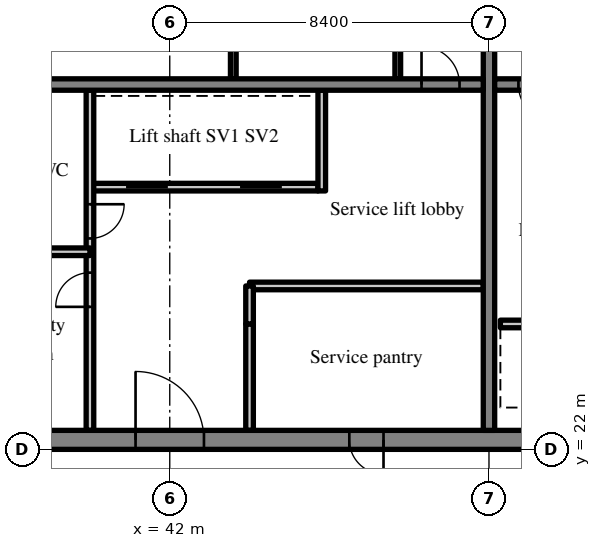
"""IFC4 building model, lengths in metres.
Left out: names, types, materials, properties, quantities, classifications, styles, units other than length and angle.
Written with IfcOpenShell. Run it as: python <this file> out.ifc"""

import sys

from ifc_helpers import new_model, si_unit, direction, frame, frame_2d, origin, place, context, subcontext, project, spatial, rectangle, extrude, source, transform, mapped, element, fill, save


model = new_model("IFC4")
c1 = context("Model", 3, precision=1e-05, world=origin(), true_north=direction((0.0, 1.0)))
c2 = subcontext(c1, "Body", "Model", "MODEL_VIEW")
j1 = project(units=[si_unit("LENGTHUNIT", "METRE"), si_unit("PLANEANGLEUNIT", "RADIAN")], contexts=[c1])
p1 = place(None, origin())
s1 = spatial("IfcSite", under=j1, at=p1, CompositionType="ELEMENT")
p2 = place(p1, origin())
s2 = spatial("IfcBuilding", under=s1, at=p2, CompositionType="ELEMENT")
p3 = place(p2, frame((0.0, 0.0, 313.7)))
s3 = spatial("IfcBuildingStorey", under=s2, at=p3, CompositionType="ELEMENT", Elevation=313.7)
m1 = source(origin(), c2, "Body", "SweptSolid", [
    extrude(rectangle(XDim=50.4, YDim=0.5, at=frame_2d((25.2, 0.0))), origin(), (0.0, 0.0, 1.0), 3.72),
])
p4 = place(p3, frame((25.2, 22.25, 0.0), z_axis=(0.0, 0.0, 1.0), x_axis=(1.0, 0.0, 0.0)))
e1 = element("IfcWall", 1, at=p4, inside=s3, PredefinedType="SHEAR", context=c2, shape_type="MappedRepresentation", body=[
    mapped(m1, transform((0.0, 0.0, 0.0), scale=1.0)),
])
m2 = source(origin(), c2, "Body", "SweptSolid", [
    extrude(rectangle(XDim=1.8, YDim=2.1, at=frame_2d((0.9, 1.05))), frame((0.0, 0.26, 0.0), z_axis=(0.0, -1.0, 0.0), x_axis=(1.0, 0.0, 0.0)), (0.0, 0.0, 1.0), 0.52),
])
p5 = place(p4, frame((15.9, 0.0, 0.0)))
e2 = element("IfcOpeningElement", 2, at=p5, cuts=e1, PredefinedType="OPENING", context=c2, shape_type="MappedRepresentation", body=[
    mapped(m2, transform((0.0, 0.0, 0.0), scale=1.0)),
])
m3 = source(origin(), c2, "Body", "SweptSolid", [
    extrude(rectangle(XDim=0.9, YDim=2.1, at=frame_2d((0.45, 1.05))), frame((0.0, 0.26, 0.0), z_axis=(0.0, -1.0, 0.0), x_axis=(1.0, 0.0, 0.0)), (0.0, 0.0, 1.0), 0.52),
])
p6 = place(p4, frame((9.675, 0.0, 0.0)))
e3 = element("IfcOpeningElement", 3, at=p6, cuts=e1, PredefinedType="OPENING", context=c2, shape_type="MappedRepresentation", body=[
    mapped(m3, transform((0.0, 0.0, 0.0), scale=1.0)),
])
p7 = place(p4, frame((21.525, 0.0, 0.0)))
e4 = element("IfcOpeningElement", 4, at=p7, cuts=e1, PredefinedType="OPENING", context=c2, shape_type="MappedRepresentation", body=[
    mapped(m3, transform((0.0, 0.0, 0.0), scale=1.0)),
])
p8 = place(p4, frame((32.7, 0.0, 0.0)))
e5 = element("IfcOpeningElement", 5, at=p8, cuts=e1, PredefinedType="OPENING", context=c2, shape_type="MappedRepresentation", body=[
    mapped(m2, transform((0.0, 0.0, 0.0), scale=1.0)),
])
m4 = source(origin(), c2, "Body", "SweptSolid", [
    extrude(rectangle(XDim=1.2, YDim=2.1, at=frame_2d((0.6, 1.05))), frame((0.0, 0.26, 0.0), z_axis=(0.0, -1.0, 0.0), x_axis=(1.0, 0.0, 0.0)), (0.0, 0.0, 1.0), 0.52),
])
p9 = place(p4, frame((6.5, 0.0, 0.0)))
e6 = element("IfcOpeningElement", 6, at=p9, cuts=e1, PredefinedType="OPENING", context=c2, shape_type="MappedRepresentation", body=[
    mapped(m4, transform((0.0, 0.0, 0.0), scale=1.0)),
])
p10 = place(p4, frame((47.975, 0.0, 0.0)))
e7 = element("IfcOpeningElement", 7, at=p10, cuts=e1, PredefinedType="OPENING", context=c2, shape_type="MappedRepresentation", body=[
    mapped(m4, transform((0.0, 0.0, 0.0), scale=1.0)),
])
m5 = source(origin(), c2, "Body", "SweptSolid", [
    extrude(rectangle(XDim=19.0, YDim=0.3, at=frame_2d((9.5, 0.0))), origin(), (0.0, 0.0, 1.0), 3.72),
])
p11 = place(p3, frame((50.4, 22.5, 0.0), z_axis=(0.0, 0.0, 1.0), x_axis=(0.0, 1.0, 0.0)))
e8 = element("IfcWall", 8, at=p11, inside=s3, PredefinedType="SHEAR", context=c2, shape_type="MappedRepresentation", body=[
    mapped(m5, transform((0.0, 0.0, 0.0), scale=1.0)),
])
m6 = source(origin(), c2, "Body", "SweptSolid", [
    extrude(rectangle(XDim=1.1, YDim=2.1, at=frame_2d((0.55, 1.05))), frame((0.0, 0.16, 0.0), z_axis=(0.0, -1.0, 0.0), x_axis=(1.0, 0.0, 0.0)), (0.0, 0.0, 1.0), 0.32),
])
p12 = place(p11, frame((12.95, 0.0, 0.0)))
e9 = element("IfcOpeningElement", 9, at=p12, cuts=e8, PredefinedType="OPENING", context=c2, shape_type="MappedRepresentation", body=[
    mapped(m6, transform((0.0, 0.0, 0.0), scale=1.0)),
])
m7 = source(origin(), c2, "Body", "SweptSolid", [
    extrude(rectangle(XDim=16.5, YDim=0.3, at=frame_2d((8.25, 0.0))), origin(), (0.0, 0.0, 1.0), 3.72),
])
p13 = place(p3, frame((33.75, 31.6, 0.0), z_axis=(0.0, 0.0, 1.0), x_axis=(1.0, 0.0, 0.0)))
e10 = element("IfcWall", 10, at=p13, inside=s3, PredefinedType="SHEAR", context=c2, shape_type="MappedRepresentation", body=[
    mapped(m7, transform((0.0, 0.0, 0.0), scale=1.0)),
])
m8 = source(origin(), c2, "Body", "SweptSolid", [
    extrude(rectangle(XDim=1.0, YDim=2.1, at=frame_2d((0.5, 1.05))), frame((0.0, 0.16, 0.0), z_axis=(0.0, -1.0, 0.0), x_axis=(1.0, 0.0, 0.0)), (0.0, 0.0, 1.0), 0.32),
])
p14 = place(p13, frame((14.875, 0.0, 0.0)))
e11 = element("IfcOpeningElement", 11, at=p14, cuts=e10, PredefinedType="OPENING", context=c2, shape_type="MappedRepresentation", body=[
    mapped(m8, transform((0.0, 0.0, 0.0), scale=1.0)),
])
p15 = place(p3, frame((50.55, 31.6, 0.0), z_axis=(0.0, 0.0, 1.0), x_axis=(1.0, 0.0, 0.0)))
e12 = element("IfcWall", 12, at=p15, inside=s3, PredefinedType="SHEAR", context=c2, shape_type="MappedRepresentation", body=[
    mapped(m7, transform((0.0, 0.0, 0.0), scale=1.0)),
])
p16 = place(p15, frame((0.625, 0.0, 0.0)))
e13 = element("IfcOpeningElement", 13, at=p16, cuts=e12, PredefinedType="OPENING", context=c2, shape_type="MappedRepresentation", body=[
    mapped(m8, transform((0.0, 0.0, 0.0), scale=1.0)),
])
m9 = source(origin(), c2, "Body", "SweptSolid", [
    extrude(rectangle(XDim=6.0, YDim=0.2, at=frame_2d((3.0, 0.0))), origin(), (0.0, 0.0, 1.0), 3.72),
])
p17 = place(p3, frame((39.9, 28.9, 0.0), z_axis=(0.0, 0.0, 1.0), x_axis=(1.0, 0.0, 0.0)))
e14 = element("IfcWall", 14, at=p17, inside=s3, PredefinedType="SOLIDWALL", context=c2, shape_type="MappedRepresentation", body=[
    mapped(m9, transform((0.0, 0.0, 0.0), scale=1.0)),
])
m10 = source(origin(), c2, "Body", "SweptSolid", [
    extrude(rectangle(XDim=1.1, YDim=2.1, at=frame_2d((0.55, 1.05))), frame((0.0, 0.11, 0.0), z_axis=(0.0, -1.0, 0.0), x_axis=(1.0, 0.0, 0.0)), (0.0, 0.0, 1.0), 0.22),
])
p18 = place(p17, frame((0.95, 0.0, 0.0)))
e15 = element("IfcOpeningElement", 15, at=p18, cuts=e14, PredefinedType="OPENING", context=c2, shape_type="MappedRepresentation", body=[
    mapped(m10, transform((0.0, 0.0, 0.0), scale=1.0)),
])
p19 = place(p17, frame((3.95, 0.0, 0.0)))
e16 = element("IfcOpeningElement", 16, at=p19, cuts=e14, PredefinedType="OPENING", context=c2, shape_type="MappedRepresentation", body=[
    mapped(m10, transform((0.0, 0.0, 0.0), scale=1.0)),
])
m11 = source(origin(), c2, "Body", "SweptSolid", [
    extrude(rectangle(XDim=8.95, YDim=0.2, at=frame_2d((4.475, 0.0))), origin(), (0.0, 0.0, 1.0), 3.72),
])
p20 = place(p3, frame((39.9, 22.5, 0.0), z_axis=(0.0, 0.0, 1.0), x_axis=(0.0, 1.0, 0.0)))
e17 = element("IfcWall", 17, at=p20, inside=s3, PredefinedType="PARTITIONING", context=c2, shape_type="MappedRepresentation", body=[
    mapped(m11, transform((0.0, 0.0, 0.0), scale=1.0)),
])
m12 = source(origin(), c2, "Body", "SweptSolid", [
    extrude(rectangle(XDim=0.9, YDim=2.1, at=frame_2d((0.45, 1.05))), frame((0.0, 0.11, 0.0), z_axis=(0.0, -1.0, 0.0), x_axis=(1.0, 0.0, 0.0)), (0.0, 0.0, 1.0), 0.22),
])
p21 = place(p20, frame((3.25, 0.0, 0.0)))
e18 = element("IfcOpeningElement", 18, at=p21, cuts=e17, PredefinedType="OPENING", context=c2, shape_type="MappedRepresentation", body=[
    mapped(m12, transform((0.0, 0.0, 0.0), scale=1.0)),
])
p22 = place(p20, frame((5.05, 0.0, 0.0)))
e19 = element("IfcOpeningElement", 19, at=p22, cuts=e17, PredefinedType="OPENING", context=c2, shape_type="MappedRepresentation", body=[
    mapped(m12, transform((0.0, 0.0, 0.0), scale=1.0)),
])
m13 = source(origin(), c2, "Body", "SweptSolid", [
    extrude(rectangle(XDim=2.8, YDim=0.2, at=frame_2d((1.4, 0.0))), origin(), (0.0, 0.0, 1.0), 3.72),
])
p23 = place(p3, frame((44.1, 22.5, 0.0), z_axis=(0.0, 0.0, 1.0), x_axis=(0.0, 1.0, 0.0)))
e20 = element("IfcWall", 20, at=p23, inside=s3, PredefinedType="PARTITIONING", context=c2, shape_type="MappedRepresentation", body=[
    mapped(m13, transform((0.0, 0.0, 0.0), scale=1.0)),
])
m14 = source(origin(), c2, "Body", "SweptSolid", [
    extrude(rectangle(XDim=2.65, YDim=0.2, at=frame_2d((1.325, 0.0))), origin(), (0.0, 0.0, 1.0), 3.72),
])
p24 = place(p3, frame((46.0, 28.8, 0.0), z_axis=(0.0, 0.0, 1.0), x_axis=(0.0, 1.0, 0.0)))
e21 = element("IfcWall", 21, at=p24, inside=s3, PredefinedType="SOLIDWALL", context=c2, shape_type="MappedRepresentation", body=[
    mapped(m14, transform((0.0, 0.0, 0.0), scale=1.0)),
])
m15 = source(origin(), c2, "Body", "SweptSolid", [
    extrude(rectangle(XDim=3.0, YDim=0.2, at=frame_2d((1.5, 0.0))), origin(), (0.0, 0.0, 1.0), 3.72),
])
p25 = place(p3, frame((36.9, 27.2, 0.0), z_axis=(0.0, 0.0, 1.0), x_axis=(1.0, 0.0, 0.0)))
e22 = element("IfcWall", 22, at=p25, inside=s3, PredefinedType="PARTITIONING", context=c2, shape_type="MappedRepresentation", body=[
    mapped(m15, transform((0.0, 0.0, 0.0), scale=1.0)),
])
m16 = source(origin(), c2, "Body", "SweptSolid", [
    extrude(rectangle(XDim=6.15, YDim=0.2, at=frame_2d((3.075, 0.0))), origin(), (0.0, 0.0, 1.0), 3.72),
])
p26 = place(p3, frame((44.1, 26.3, 0.0), z_axis=(0.0, 0.0, 1.0), x_axis=(1.0, 0.0, 0.0)))
e23 = element("IfcWall", 23, at=p26, inside=s3, PredefinedType="PARTITIONING", context=c2, shape_type="MappedRepresentation", body=[
    mapped(m16, transform((0.0, 0.0, 0.0), scale=1.0)),
])
m17 = source(origin(), c2, "Body", "SweptSolid", [
    extrude(rectangle(XDim=1.0, YDim=0.2, at=frame_2d((0.5, 0.0))), origin(), (0.0, 0.0, 1.0), 3.72),
])
p27 = place(p3, frame((44.1, 25.3, 0.0), z_axis=(0.0, 0.0, 1.0), x_axis=(0.0, 1.0, 0.0)))
e24 = element("IfcWall", 24, at=p27, inside=s3, PredefinedType="PARTITIONING", context=c2, shape_type="MappedRepresentation", body=[
    mapped(m17, transform((0.0, 0.0, 0.0), scale=1.0)),
])
m18 = source(origin(), c2, "Body", "SweptSolid", [
    extrude(rectangle(XDim=3.25, YDim=0.15, at=frame_2d((1.625, 0.0))), origin(), (0.0, 0.0, 1.0), 3.72),
])
for number, where, z_axis, x_axis in (
    (25, (48.0, 31.75, 0.0), (0.0, 0.0, 1.0), (0.0, 1.0, 0.0)),
    (26, (43.672, 31.75, 0.0), (0.0, 0.0, 1.0), (0.0, 1.0, 0.0)),
):
    element("IfcWall", number, at=place(p3, frame(where, z_axis=z_axis, x_axis=x_axis)), inside=s3, PredefinedType="PARTITIONING", context=c2, shape_type="MappedRepresentation", body=[
        mapped(m18, transform((0.0, 0.0, 0.0), scale=1.0)),
    ])
p28 = place(p3, frame((56.7, 25.3, 0.0), z_axis=(0.0, 0.0, 1.0), x_axis=(-1.0, 0.0, 0.0)))
e27 = element("IfcWall", 27, at=p28, inside=s3, PredefinedType="SOLIDWALL", context=c2, shape_type="MappedRepresentation", body=[
    mapped(m9, transform((0.0, 0.0, 0.0), scale=1.0)),
])
p29 = place(p28, frame((0.95, 0.0, 0.0)))
e28 = element("IfcOpeningElement", 28, at=p29, cuts=e27, PredefinedType="OPENING", context=c2, shape_type="MappedRepresentation", body=[
    mapped(m10, transform((0.0, 0.0, 0.0), scale=1.0)),
])
p30 = place(p28, frame((3.95, 0.0, 0.0)))
e29 = element("IfcOpeningElement", 29, at=p30, cuts=e27, PredefinedType="OPENING", context=c2, shape_type="MappedRepresentation", body=[
    mapped(m10, transform((0.0, 0.0, 0.0), scale=1.0)),
])
m19 = source(origin(), c2, "Body", "SweptSolid", [
    extrude(rectangle(XDim=1.8, YDim=2.1, at=frame_2d((0.9, 1.05))), frame((0.0, 0.175, 0.0), z_axis=(0.0, -1.0, 0.0), x_axis=(1.0, 0.0, 0.0)), (0.0, 0.0, 1.0), 0.05),
])
p31 = place(p5, origin())
e30 = element("IfcDoor", 30, at=p31, inside=s3, OperationType="DOUBLE_DOOR_SINGLE_SWING", PredefinedType="DOOR", context=c2, shape_type="MappedRepresentation", body=[
    mapped(m19, transform((0.0, 0.0, 0.0), scale=1.0)),
])
fill(e2, e30)
m20 = source(origin(), c2, "Body", "SweptSolid", [
    extrude(rectangle(XDim=1.0, YDim=2.1, at=frame_2d((0.5, 1.05))), frame((0.0, 0.025, 0.0), z_axis=(0.0, -1.0, 0.0), x_axis=(1.0, 0.0, 0.0)), (0.0, 0.0, 1.0), 0.05),
])
p32 = place(p14, origin())
e31 = element("IfcDoor", 31, at=p32, inside=s3, OperationType="SINGLE_SWING_LEFT", PredefinedType="DOOR", context=c2, shape_type="MappedRepresentation", body=[
    mapped(m20, transform((0.0, 0.0, 0.0), scale=1.0)),
])
fill(e11, e31)
m21 = source(origin(), c2, "Body", "SweptSolid", [
    extrude(rectangle(XDim=1.1, YDim=2.1, at=frame_2d((0.55, 1.05))), frame((0.0, 0.025, 0.0), z_axis=(0.0, -1.0, 0.0), x_axis=(1.0, 0.0, 0.0)), (0.0, 0.0, 1.0), 0.05),
])
p33 = place(p18, origin())
e32 = element("IfcDoor", 32, at=p33, inside=s3, OperationType="SLIDING_TO_LEFT", PredefinedType="DOOR", context=c2, shape_type="MappedRepresentation", body=[
    mapped(m21, transform((0.0, 0.0, 0.0), scale=1.0)),
])
fill(e15, e32)
p34 = place(p19, origin())
e33 = element("IfcDoor", 33, at=p34, inside=s3, OperationType="SLIDING_TO_RIGHT", PredefinedType="DOOR", context=c2, shape_type="MappedRepresentation", body=[
    mapped(m21, transform((0.0, 0.0, 0.0), scale=1.0)),
])
fill(e16, e33)
m22 = source(origin(), c2, "Body", "SweptSolid", [
    extrude(rectangle(XDim=0.9, YDim=2.1, at=frame_2d((0.45, 1.05))), frame((0.0, 0.025, 0.0), z_axis=(0.0, -1.0, 0.0), x_axis=(1.0, 0.0, 0.0)), (0.0, 0.0, 1.0), 0.05),
])
p35 = place(p21, origin())
e34 = element("IfcDoor", 34, at=p35, inside=s3, OperationType="SINGLE_SWING_LEFT", PredefinedType="DOOR", context=c2, shape_type="MappedRepresentation", body=[
    mapped(m22, transform((0.0, 0.0, 0.0), scale=1.0)),
])
fill(e18, e34)
p36 = place(p22, origin())
e35 = element("IfcDoor", 35, at=p36, inside=s3, OperationType="SINGLE_SWING_RIGHT", PredefinedType="DOOR", context=c2, shape_type="MappedRepresentation", body=[
    mapped(m22, transform((0.0, 0.0, 0.0), scale=1.0)),
])
fill(e19, e35)
m23 = source(origin(), c2, "Body", "SweptSolid", [
    extrude(rectangle(XDim=0.9, YDim=2.1, at=frame_2d((0.45, 1.05))), frame((0.0, 0.175, 0.0), z_axis=(0.0, -1.0, 0.0), x_axis=(1.0, 0.0, 0.0)), (0.0, 0.0, 1.0), 0.05),
])
p37 = place(p7, origin())
e36 = element("IfcDoor", 36, at=p37, inside=s3, OperationType="SINGLE_SWING_RIGHT", PredefinedType="DOOR", context=c2, shape_type="MappedRepresentation", body=[
    mapped(m23, transform((0.0, 0.0, 0.0), scale=1.0)),
])
fill(e4, e36)
p38 = place(p16, origin())
e37 = element("IfcDoor", 37, at=p38, inside=s3, OperationType="SINGLE_SWING_RIGHT", PredefinedType="DOOR", context=c2, shape_type="MappedRepresentation", body=[
    mapped(m20, transform((0.0, 0.0, 0.0), scale=1.0)),
])
fill(e13, e37)
save(model, sys.argv[1])
